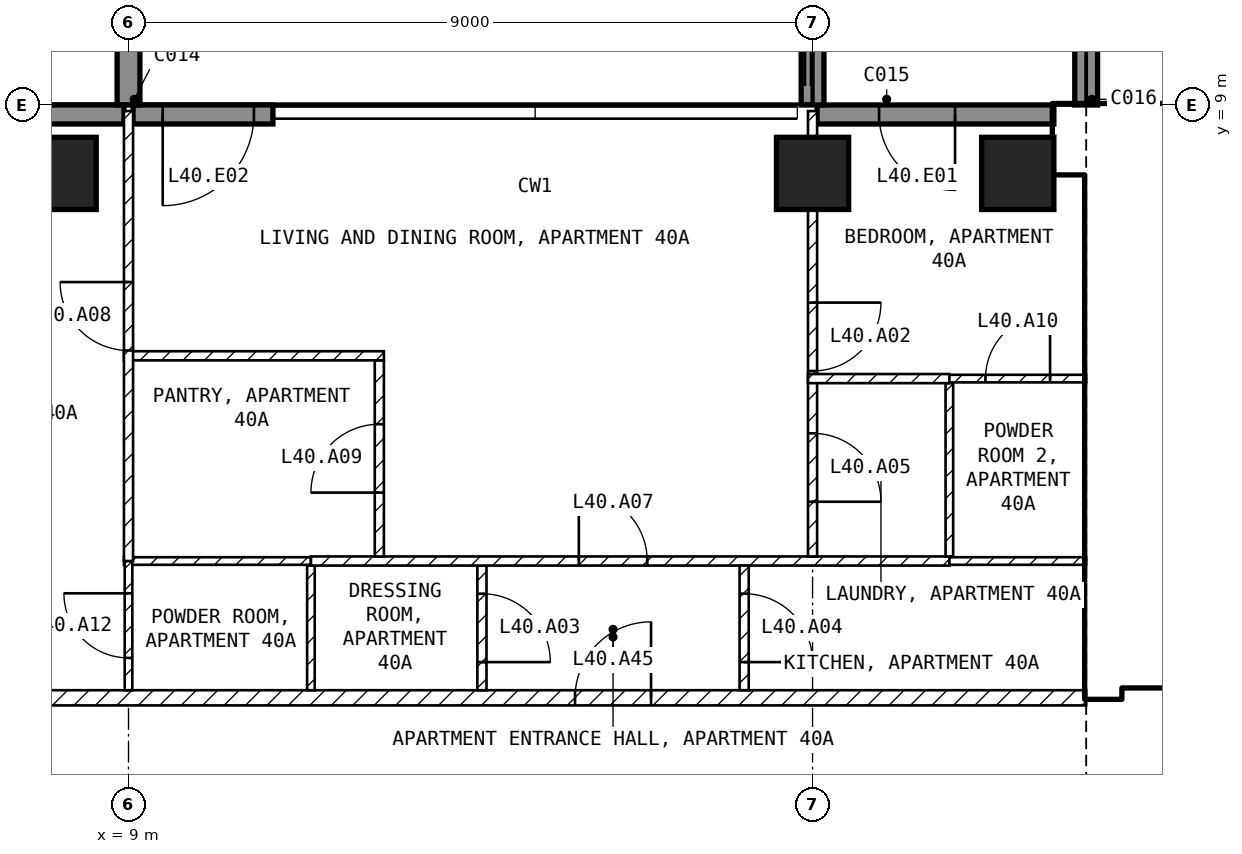
"""IFC4 building model, lengths in metres.
Left out: names, types, materials, properties, quantities, classifications, styles, units other than length and angle.
Written with IfcOpenShell. Run it as: python <this file> out.ifc"""

import sys

from ifc_helpers import new_model, si_unit, direction, frame, frame_2d, origin, origin_2d, place, context, subcontext, project, spatial, rectangle, extrude, element, fill, save


model = new_model("IFC4")
c1 = context("Model", 3, precision=1e-05, world=origin(), true_north=direction((0.0, 1.0)))
c2 = subcontext(c1, "Body", "Model", "MODEL_VIEW")
j1 = project(units=[si_unit("LENGTHUNIT", "METRE"), si_unit("PLANEANGLEUNIT", "RADIAN")], contexts=[c1])
p1 = place(None, origin())
s1 = spatial("IfcSite", under=j1, at=p1, CompositionType="ELEMENT")
p2 = place(p1, origin())
s2 = spatial("IfcBuilding", under=s1, at=p2, CompositionType="ELEMENT")
p3 = place(p2, frame((0.0, 0.0, 166.6)))
s3 = spatial("IfcBuildingStorey", under=s2, at=p3, CompositionType="ELEMENT", Elevation=166.6)
for number, where, z_axis, x_axis in (
    (1, (8.1, 8.1, -0.25), (0.0, 0.0, 1.0), (1.0, 0.0, 0.0)),
    (2, (18.0, 8.1, -0.25), (0.0, 0.0, 1.0), (1.0, 0.0, 0.0)),
    (3, (20.7, 8.1, -0.25), (0.0, 0.0, 1.0), (1.0, 0.0, 0.0)),
):
    element("IfcColumn", number, at=place(p3, frame(where, z_axis=z_axis, x_axis=x_axis)), inside=s3, PredefinedType="COLUMN", context=c2, shape_type="SweptSolid", body=[
        extrude(rectangle(XDim=0.95, YDim=0.95, at=origin_2d()), origin(), (0.0, 0.0, 1.0), 3.5),
    ])
p4 = place(p3, frame((21.175, 8.875, 0.0), z_axis=(0.0, 0.0, 1.0), x_axis=(-1.0, 0.0, 0.0)))
e4 = element("IfcWall", 4, at=p4, inside=s3, PredefinedType="SOLIDWALL", context=c2, shape_type="SweptSolid", body=[
    extrude(rectangle(XDim=3.115, YDim=0.25, at=frame_2d((1.558, 0.0))), origin(), (0.0, 0.0, 1.0), 3.25),
])
p5 = place(p4, frame((1.3, 0.0, 0.0)))
e5 = element("IfcOpeningElement", 5, at=p5, cuts=e4, PredefinedType="OPENING", context=c2, shape_type="SweptSolid", body=[
    extrude(rectangle(XDim=1.0, YDim=2.4, at=frame_2d((0.5, 1.2))), frame((0.0, 0.135, 0.0), z_axis=(0.0, -1.0, 0.0), x_axis=(1.0, 0.0, 0.0)), (0.0, 0.0, 1.0), 0.27),
])
p6 = place(p3, frame((10.9, 8.875, 0.0), z_axis=(0.0, 0.0, 1.0), x_axis=(-1.0, 0.0, 0.0)))
e6 = element("IfcWall", 6, at=p6, inside=s3, PredefinedType="SOLIDWALL", context=c2, shape_type="SweptSolid", body=[
    extrude(rectangle(XDim=1.84, YDim=0.25, at=frame_2d((0.92, 0.0))), origin(), (0.0, 0.0, 1.0), 3.25),
])
p7 = place(p6, frame((0.25, 0.0, 0.0)))
e7 = element("IfcOpeningElement", 7, at=p7, cuts=e6, PredefinedType="OPENING", context=c2, shape_type="SweptSolid", body=[
    extrude(rectangle(XDim=1.2, YDim=2.4, at=frame_2d((0.6, 1.2))), frame((0.0, 0.135, 0.0), z_axis=(0.0, -1.0, 0.0), x_axis=(1.0, 0.0, 0.0)), (0.0, 0.0, 1.0), 0.27),
])
p8 = place(p3, frame((8.94, 8.875, 0.0), z_axis=(0.0, 0.0, 1.0), x_axis=(-1.0, 0.0, 0.0)))
e8 = element("IfcWall", 8, at=p8, inside=s3, PredefinedType="SOLIDWALL", context=c2, shape_type="SweptSolid", body=[
    extrude(rectangle(XDim=3.115, YDim=0.25, at=frame_2d((1.558, 0.0))), origin(), (0.0, 0.0, 1.0), 3.25),
])
p9 = place(p8, frame((1.665, 0.0, 0.0)))
e9 = element("IfcOpeningElement", 9, at=p9, cuts=e8, PredefinedType="OPENING", context=c2, shape_type="SweptSolid", body=[
    extrude(rectangle(XDim=1.2, YDim=2.4, at=frame_2d((0.6, 1.2))), frame((0.0, 0.135, 0.0), z_axis=(0.0, -1.0, 0.0), x_axis=(1.0, 0.0, 0.0)), (0.0, 0.0, 1.0), 0.27),
])
for number, where, z_axis, x_axis in (
    (10, (9.0, 9.0, 0.0), (0.0, 0.0, 1.0), (0.0, 1.0, 0.0)),
    (11, (18.0, 9.0, 0.0), (0.0, 0.0, 1.0), (0.0, 1.0, 0.0)),
    (12, (21.6, 9.0, 0.0), (0.0, 0.0, 1.0), (0.0, 1.0, 0.0)),
):
    element("IfcWall", number, at=place(p3, frame(where, z_axis=z_axis, x_axis=x_axis)), inside=s3, PredefinedType="SOLIDWALL", context=c2, shape_type="SweptSolid", body=[
        extrude(rectangle(XDim=2.7, YDim=0.3, at=frame_2d((1.35, 0.0))), origin(), (0.0, 0.0, 1.0), 3.25),
    ])
p10 = place(p3, frame((21.175, 8.55, 0.0), z_axis=(0.0, 0.0, 1.0), x_axis=(1.0, 0.0, 0.0)))
e13 = element("IfcWall", 13, at=p10, inside=s3, PredefinedType="SHEAR", context=c2, shape_type="SweptSolid", body=[
    extrude(rectangle(XDim=8.425, YDim=0.9, at=frame_2d((4.212, 0.0))), origin(), (0.0, 0.0, 1.0), 3.25),
])
p11 = place(p3, frame((21.825, 1.2, 0.0), z_axis=(0.0, 0.0, 1.0), x_axis=(0.0, 1.0, 0.0)))
e14 = element("IfcWall", 14, at=p11, inside=s3, PredefinedType="SHEAR", context=c2, shape_type="SweptSolid", body=[
    extrude(rectangle(XDim=6.9, YDim=0.45, at=frame_2d((3.45, 0.0))), origin(), (0.0, 0.0, 1.0), 3.25),
])
p12 = place(p3, frame((22.05, 1.45, 0.0), z_axis=(0.0, 0.0, 1.0), x_axis=(1.0, 0.0, 0.0)))
e15 = element("IfcWall", 15, at=p12, inside=s3, PredefinedType="SOLIDWALL", context=c2, shape_type="SweptSolid", body=[
    extrude(rectangle(XDim=11.15, YDim=0.2, at=frame_2d((5.575, 0.0))), origin(), (0.0, 0.0, 1.0), 3.25),
])
p13 = place(p12, frame((0.75, 0.0, 0.0)))
e16 = element("IfcOpeningElement", 16, at=p13, cuts=e15, PredefinedType="OPENING", context=c2, shape_type="SweptSolid", body=[
    extrude(rectangle(XDim=1.0, YDim=2.1, at=frame_2d((0.5, 1.05))), frame((0.0, 0.11, 0.0), z_axis=(0.0, -1.0, 0.0), x_axis=(1.0, 0.0, 0.0)), (0.0, 0.0, 1.0), 0.22),
])
p14 = place(p12, frame((3.25, 0.0, 0.0)))
e17 = element("IfcOpeningElement", 17, at=p14, cuts=e15, PredefinedType="OPENING", context=c2, shape_type="SweptSolid", body=[
    extrude(rectangle(XDim=1.0, YDim=2.1, at=frame_2d((0.5, 1.05))), frame((0.0, 0.11, 0.0), z_axis=(0.0, -1.0, 0.0), x_axis=(1.0, 0.0, 0.0)), (0.0, 0.0, 1.0), 0.22),
])
p15 = place(p12, frame((9.15, 0.0, 0.0)))
e18 = element("IfcOpeningElement", 18, at=p15, cuts=e15, PredefinedType="OPENING", context=c2, shape_type="SweptSolid", body=[
    extrude(rectangle(XDim=0.9, YDim=2.1, at=frame_2d((0.45, 1.05))), frame((0.0, 0.11, 0.0), z_axis=(0.0, -1.0, 0.0), x_axis=(1.0, 0.0, 0.0)), (0.0, 0.0, 1.0), 0.22),
])
p16 = place(p3, frame((22.05, 5.15, 0.0), z_axis=(0.0, 0.0, 1.0), x_axis=(1.0, 0.0, 0.0)))
e19 = element("IfcWall", 19, at=p16, inside=s3, PredefinedType="SOLIDWALL", context=c2, shape_type="SweptSolid", body=[
    extrude(rectangle(XDim=6.3, YDim=0.2, at=frame_2d((3.15, 0.0))), origin(), (0.0, 0.0, 1.0), 3.25),
])
p17 = place(p16, frame((0.2, 0.0, 0.0)))
e20 = element("IfcOpeningElement", 20, at=p17, cuts=e19, PredefinedType="OPENING", context=c2, shape_type="SweptSolid", body=[
    extrude(rectangle(XDim=1.0, YDim=2.1, at=frame_2d((0.5, 1.05))), frame((0.0, 0.11, 0.0), z_axis=(0.0, -1.0, 0.0), x_axis=(1.0, 0.0, 0.0)), (0.0, 0.0, 1.0), 0.22),
])
p18 = place(p3, frame((4.4, 1.2, 0.0), z_axis=(0.0, 0.0, 1.0), x_axis=(1.0, 0.0, 0.0)))
e21 = element("IfcWall", 21, at=p18, inside=s3, PredefinedType="PARTITIONING", context=c2, shape_type="SweptSolid", body=[
    extrude(rectangle(XDim=17.2, YDim=0.2, at=frame_2d((8.6, 0.0))), origin(), (0.0, 0.0, 1.0), 3.25),
])
p19 = place(p18, frame((10.475, 0.0, 0.0)))
e22 = element("IfcOpeningElement", 22, at=p19, cuts=e21, PredefinedType="OPENING", context=c2, shape_type="SweptSolid", body=[
    extrude(rectangle(XDim=1.0, YDim=2.1, at=frame_2d((0.5, 1.05))), frame((0.0, 0.11, 0.0), z_axis=(0.0, -1.0, 0.0), x_axis=(1.0, 0.0, 0.0)), (0.0, 0.0, 1.0), 0.22),
])
p20 = place(p3, frame((11.4, 2.94, 0.0), z_axis=(0.0, 0.0, 1.0), x_axis=(0.0, -1.0, 0.0)))
e23 = element("IfcWall", 23, at=p20, inside=s3, PredefinedType="PARTITIONING", context=c2, shape_type="SweptSolid", body=[
    extrude(rectangle(XDim=1.64, YDim=0.1, at=frame_2d((0.82, 0.0))), origin(), (0.0, 0.0, 1.0), 3.25),
])
p21 = place(p3, frame((8.94, 3.0, 0.0), z_axis=(0.0, 0.0, 1.0), x_axis=(1.0, 0.0, 0.0)))
e24 = element("IfcWall", 24, at=p21, inside=s3, PredefinedType="PARTITIONING", context=c2, shape_type="SweptSolid", body=[
    extrude(rectangle(XDim=2.46, YDim=0.1, at=frame_2d((1.23, 0.0))), origin(), (0.0, 0.0, 1.0), 3.25),
])
p22 = place(p3, frame((9.0, 1.3, 0.0), z_axis=(0.0, 0.0, 1.0), x_axis=(0.0, 1.0, 0.0)))
e25 = element("IfcWall", 25, at=p22, inside=s3, PredefinedType="PARTITIONING", context=c2, shape_type="SweptSolid", body=[
    extrude(rectangle(XDim=1.7, YDim=0.1, at=frame_2d((0.85, 0.0))), origin(), (0.0, 0.0, 1.0), 3.25),
])
p23 = place(p22, frame((0.425, 0.0, 0.0)))
e26 = element("IfcOpeningElement", 26, at=p23, cuts=e25, PredefinedType="OPENING", context=c2, shape_type="SweptSolid", body=[
    extrude(rectangle(XDim=0.85, YDim=2.1, at=frame_2d((0.425, 1.05))), frame((0.0, 0.06, 0.0), z_axis=(0.0, -1.0, 0.0), x_axis=(1.0, 0.0, 0.0)), (0.0, 0.0, 1.0), 0.12),
])
p24 = place(p3, frame((13.65, 2.94, 0.0), z_axis=(0.0, 0.0, 1.0), x_axis=(0.0, -1.0, 0.0)))
e27 = element("IfcWall", 27, at=p24, inside=s3, PredefinedType="PARTITIONING", context=c2, shape_type="SweptSolid", body=[
    extrude(rectangle(XDim=1.64, YDim=0.12, at=frame_2d((0.82, 0.0))), origin(), (0.0, 0.0, 1.0), 3.25),
])
p25 = place(p24, frame((0.37, 0.0, 0.0)))
e28 = element("IfcOpeningElement", 28, at=p25, cuts=e27, PredefinedType="OPENING", context=c2, shape_type="SweptSolid", body=[
    extrude(rectangle(XDim=0.9, YDim=2.1, at=frame_2d((0.45, 1.05))), frame((0.0, 0.07, 0.0), z_axis=(0.0, -1.0, 0.0), x_axis=(1.0, 0.0, 0.0)), (0.0, 0.0, 1.0), 0.14),
])
p26 = place(p3, frame((11.4, 3.0, 0.0), z_axis=(0.0, 0.0, 1.0), x_axis=(1.0, 0.0, 0.0)))
e29 = element("IfcWall", 29, at=p26, inside=s3, PredefinedType="PARTITIONING", context=c2, shape_type="SweptSolid", body=[
    extrude(rectangle(XDim=8.4, YDim=0.12, at=frame_2d((4.2, 0.0))), origin(), (0.0, 0.0, 1.0), 3.25),
])
p27 = place(p26, frame((3.525, 0.0, 0.0)))
e30 = element("IfcOpeningElement", 30, at=p27, cuts=e29, PredefinedType="OPENING", context=c2, shape_type="SweptSolid", body=[
    extrude(rectangle(XDim=0.9, YDim=2.1, at=frame_2d((0.45, 1.05))), frame((0.0, 0.07, 0.0), z_axis=(0.0, -1.0, 0.0), x_axis=(1.0, 0.0, 0.0)), (0.0, 0.0, 1.0), 0.14),
])
p28 = place(p3, frame((17.1, 2.94, 0.0), z_axis=(0.0, 0.0, 1.0), x_axis=(0.0, -1.0, 0.0)))
e31 = element("IfcWall", 31, at=p28, inside=s3, PredefinedType="PARTITIONING", context=c2, shape_type="SweptSolid", body=[
    extrude(rectangle(XDim=1.64, YDim=0.12, at=frame_2d((0.82, 0.0))), origin(), (0.0, 0.0, 1.0), 3.25),
])
p29 = place(p28, frame((0.37, 0.0, 0.0)))
e32 = element("IfcOpeningElement", 32, at=p29, cuts=e31, PredefinedType="OPENING", context=c2, shape_type="SweptSolid", body=[
    extrude(rectangle(XDim=0.9, YDim=2.1, at=frame_2d((0.45, 1.05))), frame((0.0, 0.07, 0.0), z_axis=(0.0, -1.0, 0.0), x_axis=(1.0, 0.0, 0.0)), (0.0, 0.0, 1.0), 0.14),
])
p30 = place(p3, frame((19.8, 3.0, 0.0), z_axis=(0.0, 0.0, 1.0), x_axis=(1.0, 0.0, 0.0)))
e33 = element("IfcWall", 33, at=p30, inside=s3, PredefinedType="PARTITIONING", context=c2, shape_type="SweptSolid", body=[
    extrude(rectangle(XDim=1.8, YDim=0.1, at=frame_2d((0.9, 0.0))), origin(), (0.0, 0.0, 1.0), 3.25),
])
p31 = place(p3, frame((12.3, 3.06, 0.0), z_axis=(0.0, 0.0, 1.0), x_axis=(0.0, 1.0, 0.0)))
e34 = element("IfcWall", 34, at=p31, inside=s3, PredefinedType="PARTITIONING", context=c2, shape_type="SweptSolid", body=[
    extrude(rectangle(XDim=2.58, YDim=0.12, at=frame_2d((1.29, 0.0))), origin(), (0.0, 0.0, 1.0), 3.25),
])
p32 = place(p31, frame((0.84, 0.0, 0.0)))
e35 = element("IfcOpeningElement", 35, at=p32, cuts=e34, PredefinedType="OPENING", context=c2, shape_type="SweptSolid", body=[
    extrude(rectangle(XDim=0.9, YDim=2.1, at=frame_2d((0.45, 1.05))), frame((0.0, 0.07, 0.0), z_axis=(0.0, -1.0, 0.0), x_axis=(1.0, 0.0, 0.0)), (0.0, 0.0, 1.0), 0.14),
])
p33 = place(p3, frame((12.36, 5.7, 0.0), z_axis=(0.0, 0.0, 1.0), x_axis=(-1.0, 0.0, 0.0)))
e36 = element("IfcWall", 36, at=p33, inside=s3, PredefinedType="PARTITIONING", context=c2, shape_type="SweptSolid", body=[
    extrude(rectangle(XDim=3.42, YDim=0.12, at=frame_2d((1.71, 0.0))), origin(), (0.0, 0.0, 1.0), 3.25),
])
p34 = place(p3, frame((18.0, 8.92, 0.0), z_axis=(0.0, 0.0, 1.0), x_axis=(0.0, -1.0, 0.0)))
e37 = element("IfcWall", 37, at=p34, inside=s3, PredefinedType="PARTITIONING", context=c2, shape_type="SweptSolid", body=[
    extrude(rectangle(XDim=5.86, YDim=0.12, at=frame_2d((2.93, 0.0))), origin(), (0.0, 0.0, 1.0), 2.48),
])
p35 = place(p34, frame((2.52, 0.0, 0.0)))
e38 = element("IfcOpeningElement", 38, at=p35, cuts=e37, PredefinedType="OPENING", context=c2, shape_type="SweptSolid", body=[
    extrude(rectangle(XDim=0.9, YDim=2.1, at=frame_2d((0.45, 1.05))), frame((0.0, 0.07, 0.0), z_axis=(0.0, -1.0, 0.0), x_axis=(1.0, 0.0, 0.0)), (0.0, 0.0, 1.0), 0.14),
])
p36 = place(p34, frame((4.24, 0.0, 0.0)))
e39 = element("IfcOpeningElement", 39, at=p36, cuts=e37, PredefinedType="OPENING", context=c2, shape_type="SweptSolid", body=[
    extrude(rectangle(XDim=0.9, YDim=2.1, at=frame_2d((0.45, 1.05))), frame((0.0, 0.07, 0.0), z_axis=(0.0, -1.0, 0.0), x_axis=(1.0, 0.0, 0.0)), (0.0, 0.0, 1.0), 0.14),
])
p37 = place(p3, frame((9.0, 3.0, 0.0), z_axis=(0.0, 0.0, 1.0), x_axis=(0.0, 1.0, 0.0)))
e40 = element("IfcWall", 40, at=p37, inside=s3, PredefinedType="PARTITIONING", context=c2, shape_type="SweptSolid", body=[
    extrude(rectangle(XDim=5.92, YDim=0.12, at=frame_2d((2.96, 0.0))), origin(), (0.0, 0.0, 1.0), 3.25),
])
p38 = place(p37, frame((2.77, 0.0, 0.0)))
e41 = element("IfcOpeningElement", 41, at=p38, cuts=e40, PredefinedType="OPENING", context=c2, shape_type="SweptSolid", body=[
    extrude(rectangle(XDim=0.9, YDim=2.1, at=frame_2d((0.45, 1.05))), frame((0.0, 0.07, 0.0), z_axis=(0.0, -1.0, 0.0), x_axis=(1.0, 0.0, 0.0)), (0.0, 0.0, 1.0), 0.14),
])
p39 = place(p3, frame((19.8, 5.34, 0.0), z_axis=(0.0, 0.0, 1.0), x_axis=(0.0, -1.0, 0.0)))
e42 = element("IfcWall", 42, at=p39, inside=s3, PredefinedType="PARTITIONING", context=c2, shape_type="SweptSolid", body=[
    extrude(rectangle(XDim=2.28, YDim=0.1, at=frame_2d((1.14, 0.0))), origin(), (0.0, 0.0, 1.0), 3.25),
])
p40 = place(p3, frame((17.94, 5.4, 0.0), z_axis=(0.0, 0.0, 1.0), x_axis=(1.0, 0.0, 0.0)))
e43 = element("IfcWall", 43, at=p40, inside=s3, PredefinedType="PARTITIONING", context=c2, shape_type="SweptSolid", body=[
    extrude(rectangle(XDim=1.86, YDim=0.12, at=frame_2d((0.93, 0.0))), origin(), (0.0, 0.0, 1.0), 3.25),
])
p41 = place(p3, frame((19.8, 5.4, 0.0), z_axis=(0.0, 0.0, 1.0), x_axis=(1.0, 0.0, 0.0)))
e44 = element("IfcWall", 44, at=p41, inside=s3, PredefinedType="PARTITIONING", context=c2, shape_type="SweptSolid", body=[
    extrude(rectangle(XDim=1.8, YDim=0.1, at=frame_2d((0.9, 0.0))), origin(), (0.0, 0.0, 1.0), 3.25),
])
p42 = place(p41, frame((0.475, 0.0, 0.0)))
e45 = element("IfcOpeningElement", 45, at=p42, cuts=e44, PredefinedType="OPENING", context=c2, shape_type="SweptSolid", body=[
    extrude(rectangle(XDim=0.85, YDim=2.1, at=frame_2d((0.425, 1.05))), frame((0.0, 0.06, 0.0), z_axis=(0.0, -1.0, 0.0), x_axis=(1.0, 0.0, 0.0)), (0.0, 0.0, 1.0), 0.12),
])
p43 = place(p5, origin())
e46 = element("IfcDoor", 46, at=p43, inside=s3, OperationType="SINGLE_SWING_LEFT", PredefinedType="DOOR", context=c2, shape_type="SweptSolid", body=[
    extrude(rectangle(XDim=1.0, YDim=2.4, at=frame_2d((0.5, 1.2))), frame((0.0, 0.025, 0.0), z_axis=(0.0, -1.0, 0.0), x_axis=(1.0, 0.0, 0.0)), (0.0, 0.0, 1.0), 0.05),
])
fill(e5, e46)
p44 = place(p7, origin())
e47 = element("IfcDoor", 47, at=p44, inside=s3, OperationType="SINGLE_SWING_RIGHT", PredefinedType="DOOR", context=c2, shape_type="SweptSolid", body=[
    extrude(rectangle(XDim=1.2, YDim=2.4, at=frame_2d((0.6, 1.2))), frame((0.0, 0.025, 0.0), z_axis=(0.0, -1.0, 0.0), x_axis=(1.0, 0.0, 0.0)), (0.0, 0.0, 1.0), 0.05),
])
fill(e7, e47)
p45 = place(p17, origin())
e48 = element("IfcDoor", 48, at=p45, inside=s3, OperationType="SINGLE_SWING_LEFT", PredefinedType="DOOR", context=c2, shape_type="SweptSolid", body=[
    extrude(rectangle(XDim=1.0, YDim=2.1, at=frame_2d((0.5, 1.05))), frame((0.0, 0.025, 0.0), z_axis=(0.0, -1.0, 0.0), x_axis=(1.0, 0.0, 0.0)), (0.0, 0.0, 1.0), 0.05),
])
fill(e20, e48)
p46 = place(p35, origin())
e49 = element("IfcDoor", 49, at=p46, inside=s3, OperationType="SINGLE_SWING_LEFT", PredefinedType="DOOR", context=c2, shape_type="SweptSolid", body=[
    extrude(rectangle(XDim=0.9, YDim=2.1, at=frame_2d((0.45, 1.05))), frame((0.0, 0.025, 0.0), z_axis=(0.0, -1.0, 0.0), x_axis=(1.0, 0.0, 0.0)), (0.0, 0.0, 1.0), 0.05),
])
fill(e38, e49)
p47 = place(p25, origin())
e50 = element("IfcDoor", 50, at=p47, inside=s3, OperationType="SINGLE_SWING_RIGHT", PredefinedType="DOOR", context=c2, shape_type="SweptSolid", body=[
    extrude(rectangle(XDim=0.9, YDim=2.1, at=frame_2d((0.45, 1.05))), frame((0.0, 0.025, 0.0), z_axis=(0.0, -1.0, 0.0), x_axis=(1.0, 0.0, 0.0)), (0.0, 0.0, 1.0), 0.05),
])
fill(e28, e50)
p48 = place(p29, origin())
e51 = element("IfcDoor", 51, at=p48, inside=s3, OperationType="SINGLE_SWING_RIGHT", PredefinedType="DOOR", context=c2, shape_type="SweptSolid", body=[
    extrude(rectangle(XDim=0.9, YDim=2.1, at=frame_2d((0.45, 1.05))), frame((0.0, 0.025, 0.0), z_axis=(0.0, -1.0, 0.0), x_axis=(1.0, 0.0, 0.0)), (0.0, 0.0, 1.0), 0.05),
])
fill(e32, e51)
p49 = place(p36, origin())
e52 = element("IfcDoor", 52, at=p49, inside=s3, OperationType="SINGLE_SWING_RIGHT", PredefinedType="DOOR", context=c2, shape_type="SweptSolid", body=[
    extrude(rectangle(XDim=0.9, YDim=2.1, at=frame_2d((0.45, 1.05))), frame((0.0, 0.025, 0.0), z_axis=(0.0, -1.0, 0.0), x_axis=(1.0, 0.0, 0.0)), (0.0, 0.0, 1.0), 0.05),
])
fill(e39, e52)
p50 = place(p27, origin())
e53 = element("IfcDoor", 53, at=p50, inside=s3, OperationType="SINGLE_SWING_LEFT", PredefinedType="DOOR", context=c2, shape_type="SweptSolid", body=[
    extrude(rectangle(XDim=0.9, YDim=2.1, at=frame_2d((0.45, 1.05))), frame((0.0, 0.025, 0.0), z_axis=(0.0, -1.0, 0.0), x_axis=(1.0, 0.0, 0.0)), (0.0, 0.0, 1.0), 0.05),
])
fill(e30, e53)
p51 = place(p38, origin())
e54 = element("IfcDoor", 54, at=p51, inside=s3, OperationType="SINGLE_SWING_RIGHT", PredefinedType="DOOR", context=c2, shape_type="SweptSolid", body=[
    extrude(rectangle(XDim=0.9, YDim=2.1, at=frame_2d((0.45, 1.05))), frame((0.0, 0.025, 0.0), z_axis=(0.0, -1.0, 0.0), x_axis=(1.0, 0.0, 0.0)), (0.0, 0.0, 1.0), 0.05),
])
fill(e41, e54)
p52 = place(p32, origin())
e55 = element("IfcDoor", 55, at=p52, inside=s3, OperationType="SINGLE_SWING_LEFT", PredefinedType="DOOR", context=c2, shape_type="SweptSolid", body=[
    extrude(rectangle(XDim=0.9, YDim=2.1, at=frame_2d((0.45, 1.05))), frame((0.0, 0.025, 0.0), z_axis=(0.0, -1.0, 0.0), x_axis=(1.0, 0.0, 0.0)), (0.0, 0.0, 1.0), 0.05),
])
fill(e35, e55)
p53 = place(p42, origin())
e56 = element("IfcDoor", 56, at=p53, inside=s3, OperationType="SINGLE_SWING_RIGHT", PredefinedType="DOOR", context=c2, shape_type="SweptSolid", body=[
    extrude(rectangle(XDim=0.85, YDim=2.1, at=frame_2d((0.425, 1.05))), frame((0.0, 0.025, 0.0), z_axis=(0.0, -1.0, 0.0), x_axis=(1.0, 0.0, 0.0)), (0.0, 0.0, 1.0), 0.05),
])
fill(e45, e56)
p54 = place(p23, origin())
e57 = element("IfcDoor", 57, at=p54, inside=s3, OperationType="SINGLE_SWING_RIGHT", PredefinedType="DOOR", context=c2, shape_type="SweptSolid", body=[
    extrude(rectangle(XDim=0.85, YDim=2.1, at=frame_2d((0.425, 1.05))), frame((0.0, 0.025, 0.0), z_axis=(0.0, -1.0, 0.0), x_axis=(1.0, 0.0, 0.0)), (0.0, 0.0, 1.0), 0.05),
])
fill(e26, e57)
p55 = place(p19, origin())
e58 = element("IfcDoor", 58, at=p55, inside=s3, OperationType="SINGLE_SWING_RIGHT", PredefinedType="DOOR", context=c2, shape_type="SweptSolid", body=[
    extrude(rectangle(XDim=1.0, YDim=2.1, at=frame_2d((0.5, 1.05))), frame((0.0, 0.025, 0.0), z_axis=(0.0, -1.0, 0.0), x_axis=(1.0, 0.0, 0.0)), (0.0, 0.0, 1.0), 0.05),
])
fill(e22, e58)
save(model, sys.argv[1])
